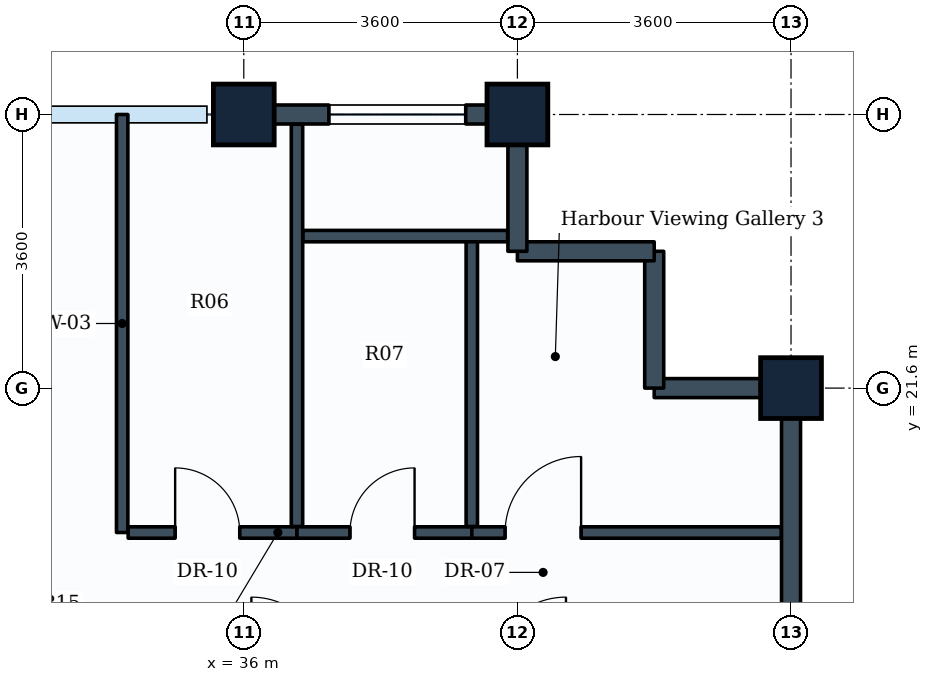
"""IFC4 building model, lengths in metres.
Left out: names, types, materials, properties, quantities, classifications, styles, units other than length and angle.
Written with IfcOpenShell. Run it as: python <this file> out.ifc"""

import sys

from ifc_helpers import new_model, si_unit, direction, frame, frame_2d, origin, origin_2d, place, context, subcontext, project, spatial, rectangle, extrude, element, fill, save


model = new_model("IFC4")
c1 = context("Model", 3, precision=1e-05, world=origin(), true_north=direction((0.0, 1.0)))
c2 = subcontext(c1, "Body", "Model", "MODEL_VIEW")
j1 = project(units=[si_unit("LENGTHUNIT", "METRE"), si_unit("PLANEANGLEUNIT", "RADIAN")], contexts=[c1])
p1 = place(None, origin())
s1 = spatial("IfcSite", under=j1, at=p1, CompositionType="ELEMENT")
p2 = place(p1, origin())
s2 = spatial("IfcBuilding", under=s1, at=p2, CompositionType="ELEMENT")
p3 = place(p2, frame((0.0, 0.0, 295.4)))
s3 = spatial("IfcBuildingStorey", under=s2, at=p3, CompositionType="ELEMENT", Elevation=295.4)
for number, where, z_axis, x_axis in (
    (1, (36.0, 25.2, 0.0), (0.0, 0.0, 1.0), (1.0, 0.0, 0.0)),
    (2, (39.6, 25.2, 0.0), (0.0, 0.0, 1.0), (1.0, 0.0, 0.0)),
    (3, (43.2, 21.6, 0.0), (0.0, 0.0, 1.0), (0.0, 1.0, 0.0)),
):
    element("IfcColumn", number, at=place(p3, frame(where, z_axis=z_axis, x_axis=x_axis)), inside=s3, PredefinedType="COLUMN", context=c2, shape_type="SweptSolid", body=[
        extrude(rectangle(XDim=0.8, YDim=0.8, at=origin_2d()), origin(), (0.0, 0.0, 1.0), 4.4),
    ])
p4 = place(p3, frame((43.2, 21.6, 0.0), z_axis=(0.0, 0.0, 1.0), x_axis=(0.0, -1.0, 0.0)))
e4 = element("IfcWall", 4, at=p4, inside=s3, PredefinedType="STANDARD", context=c2, shape_type="SweptSolid", body=[
    extrude(rectangle(XDim=3.6, YDim=0.25, at=frame_2d((1.8, 0.0))), origin(), (0.0, 0.0, 1.0), 3.63),
])
p5 = place(p3, frame((41.4, 21.6, 0.0), z_axis=(0.0, 0.0, 1.0), x_axis=(1.0, 0.0, 0.0)))
e5 = element("IfcWall", 5, at=p5, inside=s3, PredefinedType="STANDARD", context=c2, shape_type="SweptSolid", body=[
    extrude(rectangle(XDim=1.8, YDim=0.25, at=frame_2d((0.9, 0.0))), origin(), (0.0, 0.0, 1.0), 3.63),
])
for number, where, z_axis, x_axis in (
    (6, (41.4, 23.4, 0.0), (0.0, 0.0, 1.0), (0.0, -1.0, 0.0)),
    (7, (39.6, 23.4, 0.0), (0.0, 0.0, 1.0), (1.0, 0.0, 0.0)),
):
    element("IfcWall", number, at=place(p3, frame(where, z_axis=z_axis, x_axis=x_axis)), inside=s3, PredefinedType="STANDARD", context=c2, shape_type="SweptSolid", body=[
        extrude(rectangle(XDim=1.8, YDim=0.25, at=frame_2d((0.9, 0.0))), origin(), (0.0, 0.0, 1.0), 4.135),
    ])
p6 = place(p3, frame((39.6, 25.2, 0.0), z_axis=(0.0, 0.0, 1.0), x_axis=(0.0, -1.0, 0.0)))
e8 = element("IfcWall", 8, at=p6, inside=s3, PredefinedType="STANDARD", context=c2, shape_type="SweptSolid", body=[
    extrude(rectangle(XDim=1.8, YDim=0.25, at=frame_2d((0.9, 0.0))), origin(), (0.0, 0.0, 1.0), 3.63),
])
p7 = place(p3, frame((36.0, 25.2, 0.0), z_axis=(0.0, 0.0, 1.0), x_axis=(1.0, 0.0, 0.0)))
e9 = element("IfcWall", 9, at=p7, inside=s3, PredefinedType="STANDARD", context=c2, shape_type="SweptSolid", body=[
    extrude(rectangle(XDim=3.6, YDim=0.25, at=frame_2d((1.8, 0.0))), origin(), (0.0, 0.0, 1.0), 3.63),
])
p8 = place(p7, frame((1.12, 0.0, 0.85)))
e10 = element("IfcOpeningElement", 10, at=p8, cuts=e9, PredefinedType="OPENING", context=c2, shape_type="SweptSolid", body=[
    extrude(rectangle(XDim=1.8, YDim=1.35, at=frame_2d((0.9, 0.675))), frame((0.0, 0.135, 0.0), z_axis=(0.0, -1.0, 0.0), x_axis=(1.0, 0.0, 0.0)), (0.0, 0.0, 1.0), 0.27),
])
p9 = place(p3, frame((34.4, 19.7, 0.0), z_axis=(0.0, 0.0, 1.0), x_axis=(0.0, 1.0, 0.0)))
e11 = element("IfcWall", 11, at=p9, inside=s3, PredefinedType="PARTITIONING", context=c2, shape_type="SweptSolid", body=[
    extrude(rectangle(XDim=5.5, YDim=0.15, at=frame_2d((2.75, 0.0))), origin(), (0.0, 0.0, 1.0), 3.63),
])
p10 = place(p3, frame((34.479, 19.7, 0.0), z_axis=(0.0, 0.0, 1.0), x_axis=(1.0, 0.0, 0.0)))
e12 = element("IfcWall", 12, at=p10, inside=s3, PredefinedType="PARTITIONING", context=c2, shape_type="SweptSolid", body=[
    extrude(rectangle(XDim=2.221, YDim=0.15, at=frame_2d((1.11, 0.0))), origin(), (0.0, 0.0, 1.0), 3.82),
])
p11 = place(p10, frame((0.618, 0.0, 0.0)))
e13 = element("IfcOpeningElement", 13, at=p11, cuts=e12, PredefinedType="OPENING", context=c2, shape_type="SweptSolid", body=[
    extrude(rectangle(XDim=0.85, YDim=2.1, at=frame_2d((0.425, 1.05))), frame((0.0, 0.085, 0.0), z_axis=(0.0, -1.0, 0.0), x_axis=(1.0, 0.0, 0.0)), (0.0, 0.0, 1.0), 0.17),
])
p12 = place(p3, frame((36.7, 19.779, 0.0), z_axis=(0.0, 0.0, 1.0), x_axis=(0.0, 1.0, 0.0)))
e14 = element("IfcWall", 14, at=p12, inside=s3, PredefinedType="PARTITIONING", context=c2, shape_type="SweptSolid", body=[
    extrude(rectangle(XDim=5.292, YDim=0.15, at=frame_2d((2.646, 0.0))), origin(), (0.0, 0.0, 1.0), 3.63),
])
p13 = place(p3, frame((36.7, 19.7, 0.0), z_axis=(0.0, 0.0, 1.0), x_axis=(1.0, 0.0, 0.0)))
e15 = element("IfcWall", 15, at=p13, inside=s3, PredefinedType="PARTITIONING", context=c2, shape_type="SweptSolid", body=[
    extrude(rectangle(XDim=2.3, YDim=0.15, at=frame_2d((1.15, 0.0))), origin(), (0.0, 0.0, 1.0), 4.135),
])
p14 = place(p13, frame((0.697, 0.0, 0.0)))
e16 = element("IfcOpeningElement", 16, at=p14, cuts=e15, PredefinedType="OPENING", context=c2, shape_type="SweptSolid", body=[
    extrude(rectangle(XDim=0.85, YDim=2.1, at=frame_2d((0.425, 1.05))), frame((0.0, 0.085, 0.0), z_axis=(0.0, -1.0, 0.0), x_axis=(1.0, 0.0, 0.0)), (0.0, 0.0, 1.0), 0.17),
])
p15 = place(p3, frame((39.0, 19.779, 0.0), z_axis=(0.0, 0.0, 1.0), x_axis=(0.0, 1.0, 0.0)))
e17 = element("IfcWall", 17, at=p15, inside=s3, PredefinedType="PARTITIONING", context=c2, shape_type="SweptSolid", body=[
    extrude(rectangle(XDim=3.821, YDim=0.15, at=frame_2d((1.911, 0.0))), origin(), (0.0, 0.0, 1.0), 4.135),
])
p16 = place(p3, frame((36.779, 23.6, 0.0), z_axis=(0.0, 0.0, 1.0), x_axis=(1.0, 0.0, 0.0)))
e18 = element("IfcWall", 18, at=p16, inside=s3, PredefinedType="PARTITIONING", context=c2, shape_type="SweptSolid", body=[
    extrude(rectangle(XDim=2.692, YDim=0.15, at=frame_2d((1.346, 0.0))), origin(), (0.0, 0.0, 1.0), 4.135),
])
p17 = place(p3, frame((39.0, 19.7, 0.0), z_axis=(0.0, 0.0, 1.0), x_axis=(1.0, 0.0, 0.0)))
e19 = element("IfcWall", 19, at=p17, inside=s3, PredefinedType="PARTITIONING", context=c2, shape_type="SweptSolid", body=[
    extrude(rectangle(XDim=4.071, YDim=0.15, at=frame_2d((2.036, 0.0))), origin(), (0.0, 0.0, 1.0), 3.63),
])
p18 = place(p17, frame((0.438, 0.0, 0.0)))
e20 = element("IfcOpeningElement", 20, at=p18, cuts=e19, PredefinedType="OPENING", context=c2, shape_type="SweptSolid", body=[
    extrude(rectangle(XDim=1.0, YDim=2.1, at=frame_2d((0.5, 1.05))), frame((0.0, 0.085, 0.0), z_axis=(0.0, -1.0, 0.0), x_axis=(1.0, 0.0, 0.0)), (0.0, 0.0, 1.0), 0.17),
])
p19 = place(p8, origin())
e21 = element("IfcWindow", 21, at=p19, inside=s3, PartitioningType="SINGLE_PANEL", PredefinedType="WINDOW", context=c2, shape_type="SweptSolid", body=[
    extrude(rectangle(XDim=1.8, YDim=1.35, at=frame_2d((0.9, 0.675))), frame((0.0, 0.03, 0.0), z_axis=(0.0, -1.0, 0.0), x_axis=(1.0, 0.0, 0.0)), (0.0, 0.0, 1.0), 0.06),
])
fill(e10, e21)
p20 = place(p11, origin())
e22 = element("IfcDoor", 22, at=p20, inside=s3, OperationType="SINGLE_SWING_LEFT", PredefinedType="DOOR", context=c2, shape_type="SweptSolid", body=[
    extrude(rectangle(XDim=0.85, YDim=2.1, at=frame_2d((0.425, 1.05))), frame((0.0, 0.025, 0.0), z_axis=(0.0, -1.0, 0.0), x_axis=(1.0, 0.0, 0.0)), (0.0, 0.0, 1.0), 0.05),
])
fill(e13, e22)
p21 = place(p14, origin())
e23 = element("IfcDoor", 23, at=p21, inside=s3, OperationType="SINGLE_SWING_RIGHT", PredefinedType="DOOR", context=c2, shape_type="SweptSolid", body=[
    extrude(rectangle(XDim=0.85, YDim=2.1, at=frame_2d((0.425, 1.05))), frame((0.0, 0.025, 0.0), z_axis=(0.0, -1.0, 0.0), x_axis=(1.0, 0.0, 0.0)), (0.0, 0.0, 1.0), 0.05),
])
fill(e16, e23)
p22 = place(p18, origin())
e24 = element("IfcDoor", 24, at=p22, inside=s3, OperationType="SINGLE_SWING_RIGHT", PredefinedType="DOOR", context=c2, shape_type="SweptSolid", body=[
    extrude(rectangle(XDim=1.0, YDim=2.1, at=frame_2d((0.5, 1.05))), frame((0.0, 0.025, 0.0), z_axis=(0.0, -1.0, 0.0), x_axis=(1.0, 0.0, 0.0)), (0.0, 0.0, 1.0), 0.05),
])
fill(e20, e24)
save(model, sys.argv[1])
